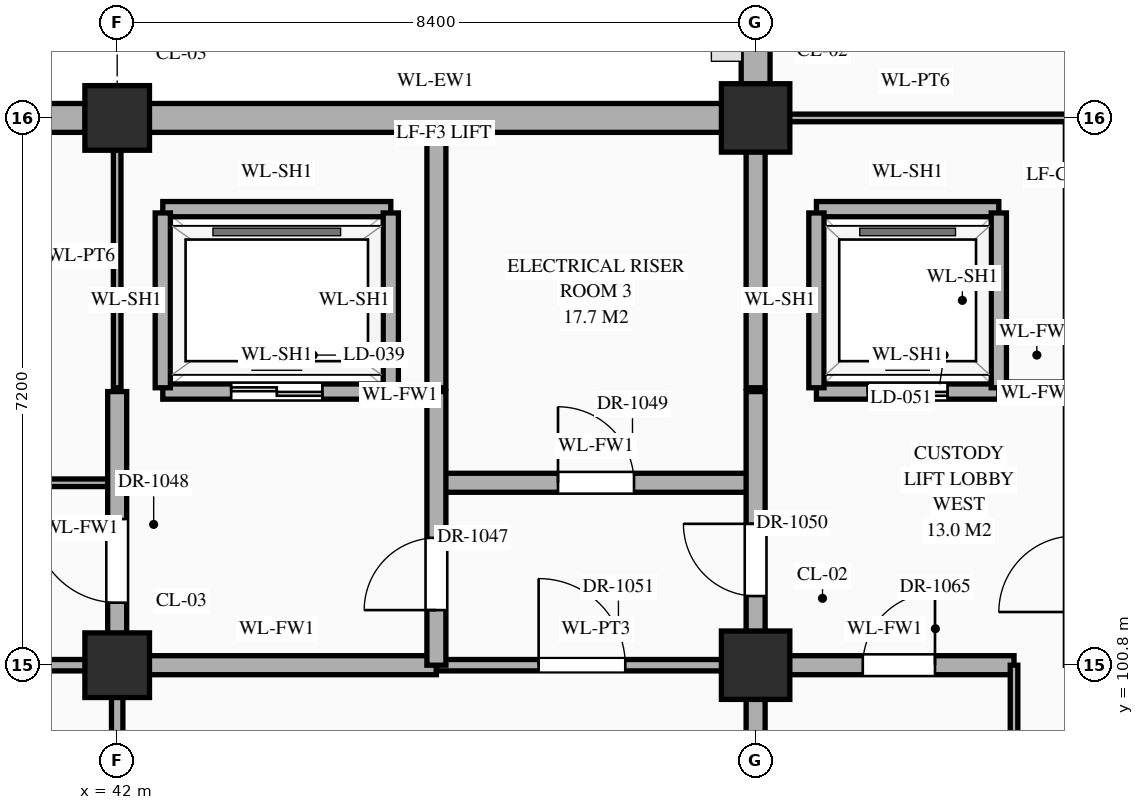
"""IFC4 building model, lengths in metres.
Left out: names, types, materials, properties, quantities, classifications, styles, units other than length and angle.
Written with IfcOpenShell. Run it as: python <this file> out.ifc"""

import sys

from ifc_helpers import new_model, si_unit, direction, frame, frame_2d, origin, origin_2d, place, context, subcontext, project, spatial, rectangle, extrude, element, fill, save


model = new_model("IFC4")
c1 = context("Model", 3, precision=1e-05, world=origin(), true_north=direction((0.0, 1.0)))
c2 = subcontext(c1, "Body", "Model", "MODEL_VIEW")
j1 = project(units=[si_unit("LENGTHUNIT", "METRE"), si_unit("PLANEANGLEUNIT", "RADIAN")], contexts=[c1])
p1 = place(None, origin())
s1 = spatial("IfcSite", under=j1, at=p1, CompositionType="ELEMENT")
p2 = place(p1, origin())
s2 = spatial("IfcBuilding", under=s1, at=p2, CompositionType="ELEMENT")
p3 = place(p2, frame((0.0, 0.0, 5.4)))
s3 = spatial("IfcBuildingStorey", under=s2, at=p3, CompositionType="ELEMENT", Elevation=5.4)
for number, where, z_axis, x_axis in (
    (1, (42.0, 100.8, 0.0), (0.0, 0.0, 1.0), (1.0, 0.0, 0.0)),
    (2, (42.0, 108.0, 0.0), (0.0, 0.0, 1.0), (1.0, 0.0, 0.0)),
):
    element("IfcColumn", number, at=place(p3, frame(where, z_axis=z_axis, x_axis=x_axis)), inside=s3, PredefinedType="COLUMN", context=c2, shape_type="SweptSolid", body=[
        extrude(rectangle(XDim=0.85, YDim=0.85, at=origin_2d()), origin(), (0.0, 0.0, 1.0), 5.4),
    ])
for number, where, z_axis, x_axis in (
    (3, (50.4, 100.8, 0.0), (0.0, 0.0, 1.0), (1.0, 0.0, 0.0)),
    (4, (50.4, 108.0, 0.0), (0.0, 0.0, 1.0), (1.0, 0.0, 0.0)),
):
    element("IfcColumn", number, at=place(p3, frame(where, z_axis=z_axis, x_axis=x_axis)), inside=s3, PredefinedType="COLUMN", context=c2, shape_type="SweptSolid", body=[
        extrude(rectangle(XDim=0.9, YDim=0.9, at=origin_2d()), origin(), (0.0, 0.0, 1.0), 5.4),
    ])
p4 = place(p3, frame((34.02, 108.0, 0.0), z_axis=(0.0, 0.0, 1.0), x_axis=(1.0, 0.0, 0.0)))
e5 = element("IfcWall", 5, at=p4, inside=s3, PredefinedType="STANDARD", context=c2, shape_type="SweptSolid", body=[
    extrude(rectangle(XDim=7.56, YDim=0.38, at=frame_2d((3.78, 0.0))), origin(), (0.0, 0.0, 1.0), 4.47),
])
p5 = place(p4, frame((5.33, 0.0, 0.85)))
e6 = element("IfcOpeningElement", 6, at=p5, cuts=e5, PredefinedType="OPENING", context=c2, shape_type="SweptSolid", body=[
    extrude(rectangle(XDim=0.9, YDim=1.56, at=frame_2d((0.45, 0.78))), frame((0.0, 0.202, 0.0), z_axis=(0.0, -1.0, 0.0), x_axis=(1.0, 0.0, 0.0)), (0.0, 0.0, 1.0), 0.404),
])
p6 = place(p3, frame((42.42, 108.0, 0.0), z_axis=(0.0, 0.0, 1.0), x_axis=(1.0, 0.0, 0.0)))
e7 = element("IfcWall", 7, at=p6, inside=s3, PredefinedType="STANDARD", context=c2, shape_type="SweptSolid", body=[
    extrude(rectangle(XDim=7.535, YDim=0.38, at=frame_2d((3.768, 0.0))), origin(), (0.0, 0.0, 1.0), 4.47),
])
p7 = place(p3, frame((50.4, 108.445, 0.0), z_axis=(0.0, 0.0, 1.0), x_axis=(0.0, 1.0, 0.0)))
e8 = element("IfcWall", 8, at=p7, inside=s3, PredefinedType="STANDARD", context=c2, shape_type="SweptSolid", body=[
    extrude(rectangle(XDim=6.335, YDim=0.38, at=frame_2d((3.167, 0.0))), origin(), (0.0, 0.0, 1.0), 4.47),
])
p8 = place(p7, frame((4.005, 0.0, 0.85)))
e9 = element("IfcOpeningElement", 9, at=p8, cuts=e8, PredefinedType="OPENING", context=c2, shape_type="SweptSolid", body=[
    extrude(rectangle(XDim=0.9, YDim=2.12, at=frame_2d((0.45, 1.06))), frame((0.0, 0.202, 0.0), z_axis=(0.0, -1.0, 0.0), x_axis=(1.0, 0.0, 0.0)), (0.0, 0.0, 1.0), 0.404),
])
p9 = place(p3, frame((31.0, 100.8, 0.0), z_axis=(0.0, 0.0, 1.0), x_axis=(1.0, 0.0, 0.0)))
e10 = element("IfcWall", 10, at=p9, inside=s3, PredefinedType="STANDARD", context=c2, shape_type="SweptSolid", body=[
    extrude(rectangle(XDim=11.0, YDim=0.15, at=frame_2d((5.5, 0.0))), origin(), (0.0, 0.0, 1.0), 4.27),
])
p10 = place(p9, frame((0.667, 0.0, 0.0)))
e11 = element("IfcOpeningElement", 11, at=p10, cuts=e10, PredefinedType="OPENING", context=c2, shape_type="SweptSolid", body=[
    extrude(rectangle(XDim=0.92, YDim=2.15, at=frame_2d((0.46, 1.075))), frame((0.0, 0.087, 0.0), z_axis=(0.0, -1.0, 0.0), x_axis=(1.0, 0.0, 0.0)), (0.0, 0.0, 1.0), 0.174),
])
p11 = place(p9, frame((6.32, 0.0, 0.0)))
e12 = element("IfcOpeningElement", 12, at=p11, cuts=e10, PredefinedType="OPENING", context=c2, shape_type="SweptSolid", body=[
    extrude(rectangle(XDim=0.96, YDim=2.2, at=frame_2d((0.48, 1.1))), frame((0.0, 0.087, 0.0), z_axis=(0.0, -1.0, 0.0), x_axis=(1.0, 0.0, 0.0)), (0.0, 0.0, 1.0), 0.174),
])
p12 = place(p3, frame((42.0, 100.8, 0.0), z_axis=(0.0, 0.0, 1.0), x_axis=(1.0, 0.0, 0.0)))
e13 = element("IfcWall", 13, at=p12, inside=s3, PredefinedType="STANDARD", context=c2, shape_type="SweptSolid", body=[
    extrude(rectangle(XDim=4.2, YDim=0.25, at=frame_2d((2.1, 0.0))), origin(), (0.0, 0.0, 1.0), 4.27),
])
p13 = place(p3, frame((46.2, 100.8, 0.0), z_axis=(0.0, 0.0, 1.0), x_axis=(1.0, 0.0, 0.0)))
e14 = element("IfcWall", 14, at=p13, inside=s3, PredefinedType="STANDARD", context=c2, shape_type="SweptSolid", body=[
    extrude(rectangle(XDim=4.2, YDim=0.15, at=frame_2d((2.1, 0.0))), origin(), (0.0, 0.0, 1.0), 4.27),
])
p14 = place(p13, frame((1.345, 0.0, 0.0)))
e15 = element("IfcOpeningElement", 15, at=p14, cuts=e14, PredefinedType="OPENING", context=c2, shape_type="SweptSolid", body=[
    extrude(rectangle(XDim=1.14, YDim=2.4, at=frame_2d((0.57, 1.2))), frame((0.0, 0.087, 0.0), z_axis=(0.0, -1.0, 0.0), x_axis=(1.0, 0.0, 0.0)), (0.0, 0.0, 1.0), 0.174),
])
p15 = place(p3, frame((50.4, 100.8, 0.0), z_axis=(0.0, 0.0, 1.0), x_axis=(1.0, 0.0, 0.0)))
e16 = element("IfcWall", 16, at=p15, inside=s3, PredefinedType="STANDARD", context=c2, shape_type="SweptSolid", body=[
    extrude(rectangle(XDim=3.4, YDim=0.25, at=frame_2d((1.7, 0.0))), origin(), (0.0, 0.0, 1.0), 4.27),
])
p16 = place(p15, frame((1.41, 0.0, 0.0)))
e17 = element("IfcOpeningElement", 17, at=p16, cuts=e16, PredefinedType="OPENING", context=c2, shape_type="SweptSolid", body=[
    extrude(rectangle(XDim=0.95, YDim=2.15, at=frame_2d((0.475, 1.075))), frame((0.0, 0.137, 0.0), z_axis=(0.0, -1.0, 0.0), x_axis=(1.0, 0.0, 0.0)), (0.0, 0.0, 1.0), 0.274),
])
p17 = place(p3, frame((0.04, 103.2, 0.0), z_axis=(0.0, 0.0, 1.0), x_axis=(1.0, 0.0, 0.0)))
e18 = element("IfcWall", 18, at=p17, inside=s3, PredefinedType="STANDARD", context=c2, shape_type="SweptSolid", body=[
    extrude(rectangle(XDim=41.96, YDim=0.1, at=frame_2d((20.98, 0.0))), origin(), (0.0, 0.0, 1.0), 5.12),
])
p18 = place(p17, frame((3.62, 0.0, 0.0)))
e19 = element("IfcOpeningElement", 19, at=p18, cuts=e18, PredefinedType="OPENING", context=c2, shape_type="SweptSolid", body=[
    extrude(rectangle(XDim=1.12, YDim=2.25, at=frame_2d((0.56, 1.125))), frame((0.0, 0.062, 0.0), z_axis=(0.0, -1.0, 0.0), x_axis=(1.0, 0.0, 0.0)), (0.0, 0.0, 1.0), 0.124),
])
p19 = place(p17, frame((11.98, 0.0, 0.0)))
e20 = element("IfcOpeningElement", 20, at=p19, cuts=e18, PredefinedType="OPENING", context=c2, shape_type="SweptSolid", body=[
    extrude(rectangle(XDim=1.16, YDim=2.3, at=frame_2d((0.58, 1.15))), frame((0.0, 0.062, 0.0), z_axis=(0.0, -1.0, 0.0), x_axis=(1.0, 0.0, 0.0)), (0.0, 0.0, 1.0), 0.124),
])
p20 = place(p17, frame((20.36, 0.0, 0.0)))
e21 = element("IfcOpeningElement", 21, at=p20, cuts=e18, PredefinedType="OPENING", context=c2, shape_type="SweptSolid", body=[
    extrude(rectangle(XDim=1.2, YDim=2.35, at=frame_2d((0.6, 1.175))), frame((0.0, 0.062, 0.0), z_axis=(0.0, -1.0, 0.0), x_axis=(1.0, 0.0, 0.0)), (0.0, 0.0, 1.0), 0.124),
])
p21 = place(p17, frame((28.74, 0.0, 0.0)))
e22 = element("IfcOpeningElement", 22, at=p21, cuts=e18, PredefinedType="OPENING", context=c2, shape_type="SweptSolid", body=[
    extrude(rectangle(XDim=1.24, YDim=2.3, at=frame_2d((0.62, 1.15))), frame((0.0, 0.062, 0.0), z_axis=(0.0, -1.0, 0.0), x_axis=(1.0, 0.0, 0.0)), (0.0, 0.0, 1.0), 0.124),
])
p22 = place(p17, frame((37.12, 0.0, 0.0)))
e23 = element("IfcOpeningElement", 23, at=p22, cuts=e18, PredefinedType="OPENING", context=c2, shape_type="SweptSolid", body=[
    extrude(rectangle(XDim=1.28, YDim=2.35, at=frame_2d((0.64, 1.175))), frame((0.0, 0.062, 0.0), z_axis=(0.0, -1.0, 0.0), x_axis=(1.0, 0.0, 0.0)), (0.0, 0.0, 1.0), 0.124),
])
p23 = place(p3, frame((46.2, 103.2, 0.0), z_axis=(0.0, 0.0, 1.0), x_axis=(1.0, 0.0, 0.0)))
e24 = element("IfcWall", 24, at=p23, inside=s3, PredefinedType="STANDARD", context=c2, shape_type="SweptSolid", body=[
    extrude(rectangle(XDim=4.2, YDim=0.25, at=frame_2d((2.1, 0.0))), origin(), (0.0, 0.0, 1.0), 5.12),
])
p24 = place(p23, frame((1.6, 0.0, 0.0)))
e25 = element("IfcOpeningElement", 25, at=p24, cuts=e24, PredefinedType="OPENING", context=c2, shape_type="SweptSolid", body=[
    extrude(rectangle(XDim=1.0, YDim=2.2, at=frame_2d((0.5, 1.1))), frame((0.0, 0.137, 0.0), z_axis=(0.0, -1.0, 0.0), x_axis=(1.0, 0.0, 0.0)), (0.0, 0.0, 1.0), 0.274),
])
p25 = place(p3, frame((42.6, 104.4, 0.0), z_axis=(0.0, 0.0, 1.0), x_axis=(1.0, 0.0, 0.0)))
e26 = element("IfcWall", 26, at=p25, inside=s3, PredefinedType="STANDARD", context=c2, shape_type="SweptSolid", body=[
    extrude(rectangle(XDim=3.0, YDim=0.2, at=frame_2d((1.5, 0.0))), origin(), (0.0, 0.0, 1.0), 5.12),
])
p26 = place(p25, frame((0.9, 0.0, 0.0)))
e27 = element("IfcOpeningElement", 27, at=p26, cuts=e26, PredefinedType="OPENING", context=c2, shape_type="SweptSolid", body=[
    extrude(rectangle(XDim=1.2, YDim=2.15, at=frame_2d((0.6, 1.075))), frame((0.0, 0.112, 0.0), z_axis=(0.0, -1.0, 0.0), x_axis=(1.0, 0.0, 0.0)), (0.0, 0.0, 1.0), 0.224),
])
p27 = place(p3, frame((51.2, 104.4, 0.0), z_axis=(0.0, 0.0, 1.0), x_axis=(1.0, 0.0, 0.0)))
e28 = element("IfcWall", 28, at=p27, inside=s3, PredefinedType="STANDARD", context=c2, shape_type="SweptSolid", body=[
    extrude(rectangle(XDim=2.4, YDim=0.2, at=frame_2d((1.2, 0.0))), origin(), (0.0, 0.0, 1.0), 5.12),
])
p28 = place(p27, frame((0.675, 0.0, 0.0)))
e29 = element("IfcOpeningElement", 29, at=p28, cuts=e28, PredefinedType="OPENING", context=c2, shape_type="SweptSolid", body=[
    extrude(rectangle(XDim=1.05, YDim=2.15, at=frame_2d((0.525, 1.075))), frame((0.0, 0.112, 0.0), z_axis=(0.0, -1.0, 0.0), x_axis=(1.0, 0.0, 0.0)), (0.0, 0.0, 1.0), 0.224),
])
p29 = place(p3, frame((53.65, 104.4, 0.0), z_axis=(0.0, 0.0, 1.0), x_axis=(1.0, 0.0, 0.0)))
e30 = element("IfcWall", 30, at=p29, inside=s3, PredefinedType="STANDARD", context=c2, shape_type="SweptSolid", body=[
    extrude(rectangle(XDim=0.9, YDim=0.25, at=frame_2d((0.45, 0.0))), origin(), (0.0, 0.0, 1.0), 5.12),
])
p30 = place(p3, frame((42.6, 106.8, 0.0), z_axis=(0.0, 0.0, 1.0), x_axis=(1.0, 0.0, 0.0)))
e31 = element("IfcWall", 31, at=p30, inside=s3, PredefinedType="STANDARD", context=c2, shape_type="SweptSolid", body=[
    extrude(rectangle(XDim=3.0, YDim=0.2, at=frame_2d((1.5, 0.0))), origin(), (0.0, 0.0, 1.0), 5.12),
])
p31 = place(p3, frame((51.2, 106.8, 0.0), z_axis=(0.0, 0.0, 1.0), x_axis=(1.0, 0.0, 0.0)))
e32 = element("IfcWall", 32, at=p31, inside=s3, PredefinedType="STANDARD", context=c2, shape_type="SweptSolid", body=[
    extrude(rectangle(XDim=2.4, YDim=0.2, at=frame_2d((1.2, 0.0))), origin(), (0.0, 0.0, 1.0), 5.12),
])
p32 = place(p3, frame((50.45, 108.0, 0.0), z_axis=(0.0, 0.0, 1.0), x_axis=(1.0, 0.0, 0.0)))
e33 = element("IfcWall", 33, at=p32, inside=s3, PredefinedType="STANDARD", context=c2, shape_type="SweptSolid", body=[
    extrude(rectangle(XDim=4.1, YDim=0.1, at=frame_2d((2.05, 0.0))), origin(), (0.0, 0.0, 1.0), 4.27),
])
p33 = place(p3, frame((42.0, 96.0, 0.0), z_axis=(0.0, 0.0, 1.0), x_axis=(0.0, 1.0, 0.0)))
e34 = element("IfcWall", 34, at=p33, inside=s3, PredefinedType="STANDARD", context=c2, shape_type="SweptSolid", body=[
    extrude(rectangle(XDim=4.8, YDim=0.15, at=frame_2d((2.4, 0.0))), origin(), (0.0, 0.0, 1.0), 4.37),
])
p34 = place(p3, frame((42.0, 100.8, 0.0), z_axis=(0.0, 0.0, 1.0), x_axis=(0.0, 1.0, 0.0)))
e35 = element("IfcWall", 35, at=p34, inside=s3, PredefinedType="STANDARD", context=c2, shape_type="SweptSolid", body=[
    extrude(rectangle(XDim=3.6, YDim=0.25, at=frame_2d((1.8, 0.0))), origin(), (0.0, 0.0, 1.0), 4.37),
])
p35 = place(p34, frame((0.823, 0.0, 0.0)))
e36 = element("IfcOpeningElement", 36, at=p35, cuts=e35, PredefinedType="OPENING", context=c2, shape_type="SweptSolid", body=[
    extrude(rectangle(XDim=1.1, YDim=2.2, at=frame_2d((0.55, 1.1))), frame((0.0, 0.137, 0.0), z_axis=(0.0, -1.0, 0.0), x_axis=(1.0, 0.0, 0.0)), (0.0, 0.0, 1.0), 0.274),
])
p36 = place(p3, frame((42.0, 104.45, 0.0), z_axis=(0.0, 0.0, 1.0), x_axis=(0.0, 1.0, 0.0)))
e37 = element("IfcWall", 37, at=p36, inside=s3, PredefinedType="STANDARD", context=c2, shape_type="SweptSolid", body=[
    extrude(rectangle(XDim=3.46, YDim=0.1, at=frame_2d((1.73, 0.0))), origin(), (0.0, 0.0, 1.0), 4.37),
])
for number, where, z_axis, x_axis in (
    (38, (42.6, 104.45, 0.0), (0.0, 0.0, 1.0), (0.0, 1.0, 0.0)),
    (39, (45.6, 104.45, 0.0), (0.0, 0.0, 1.0), (0.0, 1.0, 0.0)),
):
    element("IfcWall", number, at=place(p3, frame(where, z_axis=z_axis, x_axis=x_axis)), inside=s3, PredefinedType="STANDARD", context=c2, shape_type="SweptSolid", body=[
        extrude(rectangle(XDim=2.3, YDim=0.2, at=frame_2d((1.15, 0.0))), origin(), (0.0, 0.0, 1.0), 5.12),
    ])
p37 = place(p3, frame((46.2, 100.8, 0.0), z_axis=(0.0, 0.0, 1.0), x_axis=(0.0, 1.0, 0.0)))
e40 = element("IfcWall", 40, at=p37, inside=s3, PredefinedType="STANDARD", context=c2, shape_type="SweptSolid", body=[
    extrude(rectangle(XDim=3.6, YDim=0.25, at=frame_2d((1.8, 0.0))), origin(), (0.0, 0.0, 1.0), 4.72),
])
p38 = place(p37, frame((0.725, 0.0, 0.0)))
e41 = element("IfcOpeningElement", 41, at=p38, cuts=e40, PredefinedType="OPENING", context=c2, shape_type="SweptSolid", body=[
    extrude(rectangle(XDim=0.95, YDim=2.15, at=frame_2d((0.475, 1.075))), frame((0.0, 0.137, 0.0), z_axis=(0.0, -1.0, 0.0), x_axis=(1.0, 0.0, 0.0)), (0.0, 0.0, 1.0), 0.274),
])
p39 = place(p3, frame((46.2, 104.45, 0.0), z_axis=(0.0, 0.0, 1.0), x_axis=(0.0, 1.0, 0.0)))
e42 = element("IfcWall", 42, at=p39, inside=s3, PredefinedType="STANDARD", context=c2, shape_type="SweptSolid", body=[
    extrude(rectangle(XDim=3.46, YDim=0.25, at=frame_2d((1.73, 0.0))), origin(), (0.0, 0.0, 1.0), 4.72),
])
p40 = place(p3, frame((50.4, 91.2, 0.0), z_axis=(0.0, 0.0, 1.0), x_axis=(0.0, 1.0, 0.0)))
e43 = element("IfcWall", 43, at=p40, inside=s3, PredefinedType="STANDARD", context=c2, shape_type="SweptSolid", body=[
    extrude(rectangle(XDim=13.2, YDim=0.25, at=frame_2d((6.6, 0.0))), origin(), (0.0, 0.0, 1.0), 4.37),
])
p41 = place(p40, frame((0.54, 0.0, 0.0)))
e44 = element("IfcOpeningElement", 44, at=p41, cuts=e43, PredefinedType="OPENING", context=c2, shape_type="SweptSolid", body=[
    extrude(rectangle(XDim=0.95, YDim=2.15, at=frame_2d((0.475, 1.075))), frame((0.0, 0.137, 0.0), z_axis=(0.0, -1.0, 0.0), x_axis=(1.0, 0.0, 0.0)), (0.0, 0.0, 1.0), 0.274),
])
p42 = place(p40, frame((10.51, 0.0, 0.0)))
e45 = element("IfcOpeningElement", 45, at=p42, cuts=e43, PredefinedType="OPENING", context=c2, shape_type="SweptSolid", body=[
    extrude(rectangle(XDim=0.95, YDim=2.15, at=frame_2d((0.475, 1.075))), frame((0.0, 0.137, 0.0), z_axis=(0.0, -1.0, 0.0), x_axis=(1.0, 0.0, 0.0)), (0.0, 0.0, 1.0), 0.274),
])
p43 = place(p40, frame((3.285, 0.0, 0.0)))
e46 = element("IfcOpeningElement", 46, at=p43, cuts=e43, PredefinedType="OPENING", context=c2, shape_type="SweptSolid", body=[
    extrude(rectangle(XDim=1.0, YDim=2.2, at=frame_2d((0.5, 1.1))), frame((0.0, 0.137, 0.0), z_axis=(0.0, -1.0, 0.0), x_axis=(1.0, 0.0, 0.0)), (0.0, 0.0, 1.0), 0.274),
])
p44 = place(p3, frame((50.4, 104.45, 0.0), z_axis=(0.0, 0.0, 1.0), x_axis=(0.0, 1.0, 0.0)))
e47 = element("IfcWall", 47, at=p44, inside=s3, PredefinedType="STANDARD", context=c2, shape_type="SweptSolid", body=[
    extrude(rectangle(XDim=3.46, YDim=0.25, at=frame_2d((1.73, 0.0))), origin(), (0.0, 0.0, 1.0), 4.37),
])
for number, where, z_axis, x_axis in (
    (48, (51.2, 104.45, 0.0), (0.0, 0.0, 1.0), (0.0, 1.0, 0.0)),
    (49, (53.6, 104.45, 0.0), (0.0, 0.0, 1.0), (0.0, 1.0, 0.0)),
):
    element("IfcWall", number, at=place(p3, frame(where, z_axis=z_axis, x_axis=x_axis)), inside=s3, PredefinedType="STANDARD", context=c2, shape_type="SweptSolid", body=[
        extrude(rectangle(XDim=2.3, YDim=0.2, at=frame_2d((1.15, 0.0))), origin(), (0.0, 0.0, 1.0), 5.12),
    ])
p45 = place(p3, frame((53.8, 96.0, 0.0), z_axis=(0.0, 0.0, 1.0), x_axis=(0.0, 1.0, 0.0)))
e50 = element("IfcWall", 50, at=p45, inside=s3, PredefinedType="STANDARD", context=c2, shape_type="SweptSolid", body=[
    extrude(rectangle(XDim=4.8, YDim=0.1, at=frame_2d((2.4, 0.0))), origin(), (0.0, 0.0, 1.0), 5.12),
])
p46 = place(p45, frame((1.87, 0.0, 0.0)))
e51 = element("IfcOpeningElement", 51, at=p46, cuts=e50, PredefinedType="OPENING", context=c2, shape_type="SweptSolid", body=[
    extrude(rectangle(XDim=1.06, YDim=2.4, at=frame_2d((0.53, 1.2))), frame((0.0, 0.062, 0.0), z_axis=(0.0, -1.0, 0.0), x_axis=(1.0, 0.0, 0.0)), (0.0, 0.0, 1.0), 0.124),
])
p47 = place(p26, origin())
e52 = element("IfcDoor", 52, at=p47, inside=s3, OperationType="DOUBLE_DOOR_SLIDING", PredefinedType="DOOR", context=c2, shape_type="SweptSolid", body=[
    extrude(rectangle(XDim=1.2, YDim=2.15, at=frame_2d((0.6, 1.075))), frame((0.0, 0.025, 0.0), z_axis=(0.0, -1.0, 0.0), x_axis=(1.0, 0.0, 0.0)), (0.0, 0.0, 1.0), 0.05),
])
fill(e27, e52)
p48 = place(p28, origin())
e53 = element("IfcDoor", 53, at=p48, inside=s3, OperationType="DOUBLE_DOOR_SLIDING", PredefinedType="DOOR", context=c2, shape_type="SweptSolid", body=[
    extrude(rectangle(XDim=1.05, YDim=2.15, at=frame_2d((0.525, 1.075))), frame((0.0, 0.025, 0.0), z_axis=(0.0, -1.0, 0.0), x_axis=(1.0, 0.0, 0.0)), (0.0, 0.0, 1.0), 0.05),
])
fill(e29, e53)
p49 = place(p38, origin())
e54 = element("IfcDoor", 54, at=p49, inside=s3, OperationType="SINGLE_SWING_LEFT", PredefinedType="DOOR", context=c2, shape_type="SweptSolid", body=[
    extrude(rectangle(XDim=0.95, YDim=2.15, at=frame_2d((0.475, 1.075))), frame((0.0, 0.025, 0.0), z_axis=(0.0, -1.0, 0.0), x_axis=(1.0, 0.0, 0.0)), (0.0, 0.0, 1.0), 0.05),
])
fill(e41, e54)
p50 = place(p35, origin())
e55 = element("IfcDoor", 55, at=p50, inside=s3, OperationType="SINGLE_SWING_RIGHT", PredefinedType="DOOR", context=c2, shape_type="SweptSolid", body=[
    extrude(rectangle(XDim=1.1, YDim=2.2, at=frame_2d((0.55, 1.1))), frame((0.0, 0.025, 0.0), z_axis=(0.0, -1.0, 0.0), x_axis=(1.0, 0.0, 0.0)), (0.0, 0.0, 1.0), 0.05),
])
fill(e36, e55)
p51 = place(p24, origin())
e56 = element("IfcDoor", 56, at=p51, inside=s3, OperationType="SINGLE_SWING_LEFT", PredefinedType="DOOR", context=c2, shape_type="SweptSolid", body=[
    extrude(rectangle(XDim=1.0, YDim=2.2, at=frame_2d((0.5, 1.1))), frame((0.0, 0.025, 0.0), z_axis=(0.0, -1.0, 0.0), x_axis=(1.0, 0.0, 0.0)), (0.0, 0.0, 1.0), 0.05),
])
fill(e25, e56)
p52 = place(p42, origin())
e57 = element("IfcDoor", 57, at=p52, inside=s3, OperationType="SINGLE_SWING_RIGHT", PredefinedType="DOOR", context=c2, shape_type="SweptSolid", body=[
    extrude(rectangle(XDim=0.95, YDim=2.15, at=frame_2d((0.475, 1.075))), frame((0.0, 0.025, 0.0), z_axis=(0.0, -1.0, 0.0), x_axis=(1.0, 0.0, 0.0)), (0.0, 0.0, 1.0), 0.05),
])
fill(e45, e57)
p53 = place(p14, origin())
e58 = element("IfcDoor", 58, at=p53, inside=s3, OperationType="SINGLE_SWING_LEFT", PredefinedType="DOOR", context=c2, shape_type="SweptSolid", body=[
    extrude(rectangle(XDim=1.14, YDim=2.4, at=frame_2d((0.57, 1.2))), frame((0.0, 0.025, 0.0), z_axis=(0.0, -1.0, 0.0), x_axis=(1.0, 0.0, 0.0)), (0.0, 0.0, 1.0), 0.05),
])
fill(e15, e58)
p54 = place(p16, origin())
e59 = element("IfcDoor", 59, at=p54, inside=s3, OperationType="SINGLE_SWING_RIGHT", PredefinedType="DOOR", context=c2, shape_type="SweptSolid", body=[
    extrude(rectangle(XDim=0.95, YDim=2.15, at=frame_2d((0.475, 1.075))), frame((0.0, 0.025, 0.0), z_axis=(0.0, -1.0, 0.0), x_axis=(1.0, 0.0, 0.0)), (0.0, 0.0, 1.0), 0.05),
])
fill(e17, e59)
save(model, sys.argv[1])
